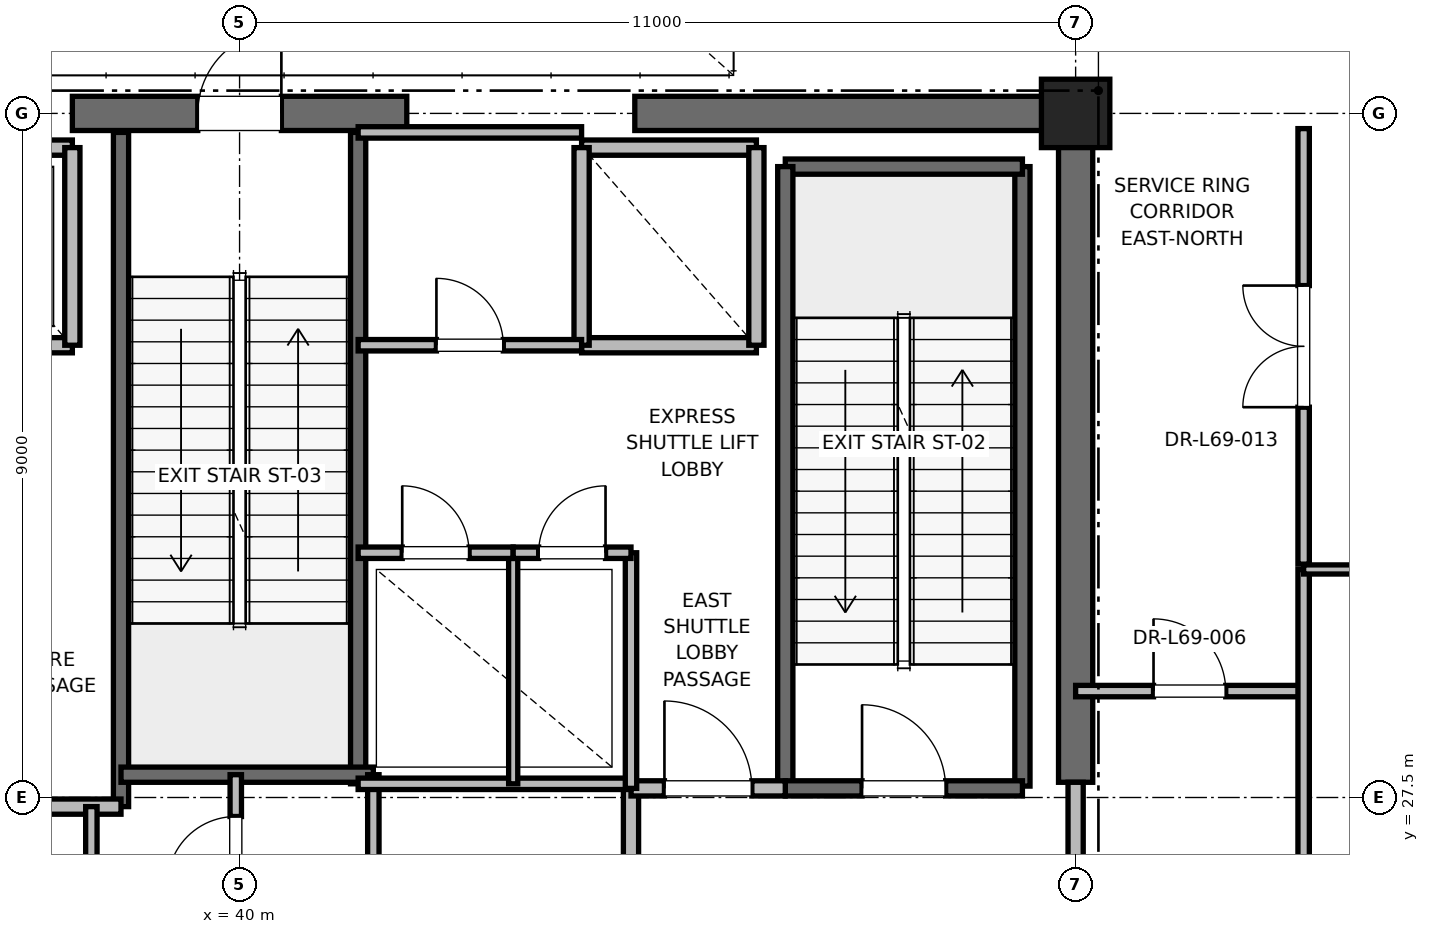
"""IFC4 building model, lengths in metres.
Left out: names, types, materials, properties, quantities, classifications, styles, units other than length and angle.
Written with IfcOpenShell. Run it as: python <this file> out.ifc"""

import sys

from ifc_helpers import new_model, si_unit, direction, frame, frame_2d, origin, origin_2d, place, context, subcontext, project, spatial, rectangle, extrude, element, fill, save


model = new_model("IFC4")
c1 = context("Model", 3, precision=1e-05, world=origin(), true_north=direction((0.0, 1.0)))
c2 = subcontext(c1, "Body", "Model", "MODEL_VIEW")
j1 = project(units=[si_unit("LENGTHUNIT", "METRE"), si_unit("PLANEANGLEUNIT", "RADIAN")], contexts=[c1])
p1 = place(None, origin())
s1 = spatial("IfcSite", under=j1, at=p1, CompositionType="ELEMENT")
p2 = place(p1, origin())
s2 = spatial("IfcBuilding", under=s1, at=p2, CompositionType="ELEMENT")
p3 = place(p2, frame((0.0, 0.0, 295.2)))
s3 = spatial("IfcBuildingStorey", under=s2, at=p3, CompositionType="ELEMENT", Elevation=295.2)
p4 = place(p3, frame((51.0, 36.5, 0.0), z_axis=(0.0, 0.0, 1.0), x_axis=(1.0, 0.0, 0.0)))
e1 = element("IfcColumn", 1, at=p4, inside=s3, PredefinedType="PILASTER", context=c2, shape_type="SweptSolid", body=[
    extrude(rectangle(XDim=0.9, YDim=0.9, at=origin_2d()), origin(), (0.0, 0.0, 1.0), 5.8),
])
p5 = place(p3, frame((37.8, 36.5, 0.0), z_axis=(0.0, 0.0, 1.0), x_axis=(1.0, 0.0, 0.0)))
e2 = element("IfcWall", 2, at=p5, inside=s3, PredefinedType="SHEAR", context=c2, shape_type="SweptSolid", body=[
    extrude(rectangle(XDim=4.4, YDim=0.45, at=frame_2d((2.2, 0.0))), origin(), (0.0, 0.0, 1.0), 5.5),
])
p6 = place(p5, frame((1.65, 0.0, 0.0)))
e3 = element("IfcOpeningElement", 3, at=p6, cuts=e2, PredefinedType="OPENING", context=c2, shape_type="SweptSolid", body=[
    extrude(rectangle(XDim=1.1, YDim=2.15, at=frame_2d((0.55, 1.075))), frame((0.0, 0.225, 0.0), z_axis=(0.0, -1.0, 0.0), x_axis=(1.0, 0.0, 0.0)), (0.0, 0.0, 1.0), 0.45),
])
p7 = place(p3, frame((45.2, 36.5, 0.0), z_axis=(0.0, 0.0, 1.0), x_axis=(1.0, 0.0, 0.0)))
e4 = element("IfcWall", 4, at=p7, inside=s3, PredefinedType="SHEAR", context=c2, shape_type="SweptSolid", body=[
    extrude(rectangle(XDim=5.8, YDim=0.45, at=frame_2d((2.9, 0.0))), origin(), (0.0, 0.0, 1.0), 5.5),
])
p8 = place(p3, frame((51.0, 27.7, 0.0), z_axis=(0.0, 0.0, 1.0), x_axis=(0.0, 1.0, 0.0)))
e5 = element("IfcWall", 5, at=p8, inside=s3, PredefinedType="SHEAR", context=c2, shape_type="SweptSolid", body=[
    extrude(rectangle(XDim=8.8, YDim=0.45, at=frame_2d((4.4, 0.0))), origin(), (0.0, 0.0, 1.0), 5.5),
])
p9 = place(p3, frame((50.3, 27.65, 0.0), z_axis=(0.0, 0.0, 1.0), x_axis=(0.0, 1.0, 0.0)))
e6 = element("IfcWall", 6, at=p9, inside=s3, PredefinedType="SOLIDWALL", context=c2, shape_type="SweptSolid", body=[
    extrude(rectangle(XDim=8.15, YDim=0.2, at=frame_2d((4.075, 0.0))), origin(), (0.0, 0.0, 1.0), 5.5),
])
p10 = place(p3, frame((47.18, 35.8, 0.0), z_axis=(0.0, 0.0, 1.0), x_axis=(1.0, 0.0, 0.0)))
e7 = element("IfcWall", 7, at=p10, inside=s3, PredefinedType="SOLIDWALL", context=c2, shape_type="SweptSolid", body=[
    extrude(rectangle(XDim=3.12, YDim=0.2, at=frame_2d((1.56, 0.0))), origin(), (0.0, 0.0, 1.0), 5.5),
])
p11 = place(p3, frame((47.18, 27.62, 0.0), z_axis=(0.0, 0.0, 1.0), x_axis=(0.0, 1.0, 0.0)))
e8 = element("IfcWall", 8, at=p11, inside=s3, PredefinedType="SOLIDWALL", context=c2, shape_type="SweptSolid", body=[
    extrude(rectangle(XDim=8.18, YDim=0.2, at=frame_2d((4.09, 0.0))), origin(), (0.0, 0.0, 1.0), 5.5),
])
p12 = place(p3, frame((47.18, 27.62, 0.0), z_axis=(0.0, 0.0, 1.0), x_axis=(1.0, 0.0, 0.0)))
e9 = element("IfcWall", 9, at=p12, inside=s3, PredefinedType="SOLIDWALL", context=c2, shape_type="SweptSolid", body=[
    extrude(rectangle(XDim=3.12, YDim=0.2, at=frame_2d((1.56, 0.0))), origin(), (0.0, 0.0, 1.0), 5.5),
])
p13 = place(p12, frame((1.01, 0.0, 0.0)))
e10 = element("IfcOpeningElement", 10, at=p13, cuts=e9, PredefinedType="OPENING", context=c2, shape_type="SweptSolid", body=[
    extrude(rectangle(XDim=1.1, YDim=2.15, at=frame_2d((0.55, 1.075))), frame((0.0, 0.1, 0.0), z_axis=(0.0, -1.0, 0.0), x_axis=(1.0, 0.0, 0.0)), (0.0, 0.0, 1.0), 0.2),
])
p14 = place(p3, frame((38.44, 27.38, 0.0), z_axis=(0.0, 0.0, 1.0), x_axis=(0.0, 1.0, 0.0)))
e11 = element("IfcWall", 11, at=p14, inside=s3, PredefinedType="SOLIDWALL", context=c2, shape_type="SweptSolid", body=[
    extrude(rectangle(XDim=8.87, YDim=0.2, at=frame_2d((4.435, 0.0))), origin(), (0.0, 0.0, 1.0), 5.5),
])
p15 = place(p3, frame((41.56, 27.68, 0.0), z_axis=(0.0, 0.0, 1.0), x_axis=(0.0, 1.0, 0.0)))
e12 = element("IfcWall", 12, at=p15, inside=s3, PredefinedType="SOLIDWALL", context=c2, shape_type="SweptSolid", body=[
    extrude(rectangle(XDim=8.57, YDim=0.2, at=frame_2d((4.285, 0.0))), origin(), (0.0, 0.0, 1.0), 5.5),
])
p16 = place(p3, frame((38.44, 27.8, 0.0), z_axis=(0.0, 0.0, 1.0), x_axis=(1.0, 0.0, 0.0)))
e13 = element("IfcWall", 13, at=p16, inside=s3, PredefinedType="SOLIDWALL", context=c2, shape_type="SweptSolid", body=[
    extrude(rectangle(XDim=3.32, YDim=0.2, at=frame_2d((1.66, 0.0))), origin(), (0.0, 0.0, 1.0), 5.5),
])
p17 = place(p3, frame((32.82, 27.38, 0.0), z_axis=(0.0, 0.0, 1.0), x_axis=(1.0, 0.0, 0.0)))
e14 = element("IfcWall", 14, at=p17, inside=s3, PredefinedType="PARTITIONING", context=c2, shape_type="SweptSolid", body=[
    extrude(rectangle(XDim=5.62, YDim=0.2, at=frame_2d((2.81, 0.0))), origin(), (0.0, 0.0, 1.0), 5.5),
])
p18 = place(p3, frame((45.15, 24.25, 0.0), z_axis=(0.0, 0.0, 1.0), x_axis=(0.0, 1.0, 0.0)))
e15 = element("IfcWall", 15, at=p18, inside=s3, PredefinedType="PARTITIONING", context=c2, shape_type="SweptSolid", body=[
    extrude(rectangle(XDim=3.37, YDim=0.2, at=frame_2d((1.685, 0.0))), origin(), (0.0, 0.0, 1.0), 5.5),
])
p19 = place(p3, frame((45.15, 27.62, 0.0), z_axis=(0.0, 0.0, 1.0), x_axis=(1.0, 0.0, 0.0)))
e16 = element("IfcWall", 16, at=p19, inside=s3, PredefinedType="PARTITIONING", context=c2, shape_type="SweptSolid", body=[
    extrude(rectangle(XDim=2.03, YDim=0.2, at=frame_2d((1.015, 0.0))), origin(), (0.0, 0.0, 1.0), 5.5),
])
p20 = place(p19, frame((0.44, 0.0, 0.0)))
e17 = element("IfcOpeningElement", 17, at=p20, cuts=e16, PredefinedType="OPENING", context=c2, shape_type="SweptSolid", body=[
    extrude(rectangle(XDim=1.15, YDim=2.2, at=frame_2d((0.575, 1.1))), frame((0.0, 0.1, 0.0), z_axis=(0.0, -1.0, 0.0), x_axis=(1.0, 0.0, 0.0)), (0.0, 0.0, 1.0), 0.2),
])
p21 = place(p3, frame((51.0, 24.3, 0.0), z_axis=(0.0, 0.0, 1.0), x_axis=(0.0, 1.0, 0.0)))
e18 = element("IfcWall", 18, at=p21, inside=s3, PredefinedType="PARTITIONING", context=c2, shape_type="SweptSolid", body=[
    extrude(rectangle(XDim=3.4, YDim=0.2, at=frame_2d((1.7, 0.0))), origin(), (0.0, 0.0, 1.0), 4.58),
])
p22 = place(p21, frame((1.125, 0.0, 0.0)))
e19 = element("IfcOpeningElement", 19, at=p22, cuts=e18, PredefinedType="OPENING", context=c2, shape_type="SweptSolid", body=[
    extrude(rectangle(XDim=1.15, YDim=2.2, at=frame_2d((0.575, 1.1))), frame((0.0, 0.1, 0.0), z_axis=(0.0, -1.0, 0.0), x_axis=(1.0, 0.0, 0.0)), (0.0, 0.0, 1.0), 0.2),
])
p23 = place(p3, frame((35.5, 33.45, 0.0), z_axis=(0.0, 0.0, 1.0), x_axis=(1.0, 0.0, 0.0)))
e20 = element("IfcWall", 20, at=p23, inside=s3, PredefinedType="SOLIDWALL", context=c2, shape_type="SweptSolid", body=[
    extrude(rectangle(XDim=2.3, YDim=0.2, at=frame_2d((1.15, 0.0))), origin(), (0.0, 0.0, 1.0), 5.5),
])
p24 = place(p23, frame((0.6, 0.0, 0.0)))
e21 = element("IfcOpeningElement", 21, at=p24, cuts=e20, PredefinedType="OPENING", context=c2, shape_type="SweptSolid", body=[
    extrude(rectangle(XDim=1.1, YDim=2.2, at=frame_2d((0.55, 1.1))), frame((0.0, 0.1, 0.0), z_axis=(0.0, -1.0, 0.0), x_axis=(1.0, 0.0, 0.0)), (0.0, 0.0, 1.0), 0.2),
])
p25 = place(p3, frame((37.8, 36.05, 0.0), z_axis=(0.0, 0.0, 1.0), x_axis=(-1.0, 0.0, 0.0)))
e22 = element("IfcWall", 22, at=p25, inside=s3, PredefinedType="SOLIDWALL", context=c2, shape_type="SweptSolid", body=[
    extrude(rectangle(XDim=2.3, YDim=0.2, at=frame_2d((1.15, 0.0))), origin(), (0.0, 0.0, 1.0), 4.58),
])
p26 = place(p3, frame((37.8, 33.45, 0.0), z_axis=(0.0, 0.0, 1.0), x_axis=(0.0, 1.0, 0.0)))
e23 = element("IfcWall", 23, at=p26, inside=s3, PredefinedType="SOLIDWALL", context=c2, shape_type="SweptSolid", body=[
    extrude(rectangle(XDim=2.6, YDim=0.2, at=frame_2d((1.3, 0.0))), origin(), (0.0, 0.0, 1.0), 4.58),
])
p27 = place(p3, frame((44.5, 33.45, 0.0), z_axis=(0.0, 0.0, 1.0), x_axis=(1.0, 0.0, 0.0)))
e24 = element("IfcWall", 24, at=p27, inside=s3, PredefinedType="SOLIDWALL", context=c2, shape_type="SweptSolid", body=[
    extrude(rectangle(XDim=2.3, YDim=0.2, at=frame_2d((1.15, 0.0))), origin(), (0.0, 0.0, 1.0), 5.5),
])
p28 = place(p3, frame((46.8, 36.05, 0.0), z_axis=(0.0, 0.0, 1.0), x_axis=(-1.0, 0.0, 0.0)))
e25 = element("IfcWall", 25, at=p28, inside=s3, PredefinedType="SOLIDWALL", context=c2, shape_type="SweptSolid", body=[
    extrude(rectangle(XDim=2.3, YDim=0.2, at=frame_2d((1.15, 0.0))), origin(), (0.0, 0.0, 1.0), 4.58),
])
p29 = place(p3, frame((44.5, 36.05, 0.0), z_axis=(0.0, 0.0, 1.0), x_axis=(0.0, -1.0, 0.0)))
e26 = element("IfcWall", 26, at=p29, inside=s3, PredefinedType="SOLIDWALL", context=c2, shape_type="SweptSolid", body=[
    extrude(rectangle(XDim=2.6, YDim=0.2, at=frame_2d((1.3, 0.0))), origin(), (0.0, 0.0, 1.0), 4.58),
])
p30 = place(p3, frame((46.8, 33.45, 0.0), z_axis=(0.0, 0.0, 1.0), x_axis=(0.0, 1.0, 0.0)))
e27 = element("IfcWall", 27, at=p30, inside=s3, PredefinedType="SOLIDWALL", context=c2, shape_type="SweptSolid", body=[
    extrude(rectangle(XDim=2.6, YDim=0.2, at=frame_2d((1.3, 0.0))), origin(), (0.0, 0.0, 1.0), 5.5),
])
p31 = place(p3, frame((41.76, 23.8, 0.0), z_axis=(0.0, 0.0, 1.0), x_axis=(0.0, 1.0, 0.0)))
e28 = element("IfcWall", 28, at=p31, inside=s3, PredefinedType="PARTITIONING", context=c2, shape_type="SweptSolid", body=[
    extrude(rectangle(XDim=4.0, YDim=0.15, at=frame_2d((2.0, 0.0))), origin(), (0.0, 0.0, 1.0), 2.85),
])
p32 = place(p3, frame((39.95, 25.8, 0.0), z_axis=(0.0, 0.0, 1.0), x_axis=(0.0, 1.0, 0.0)))
e29 = element("IfcWall", 29, at=p32, inside=s3, PredefinedType="PARTITIONING", context=c2, shape_type="SweptSolid", body=[
    extrude(rectangle(XDim=2.0, YDim=0.15, at=frame_2d((1.0, 0.0))), origin(), (0.0, 0.0, 1.0), 2.85),
])
p33 = place(p32, frame((0.55, 0.0, 0.0)))
e30 = element("IfcOpeningElement", 30, at=p33, cuts=e29, PredefinedType="OPENING", context=c2, shape_type="SweptSolid", body=[
    extrude(rectangle(XDim=0.9, YDim=2.1, at=frame_2d((0.45, 1.05))), frame((0.0, 0.075, 0.0), z_axis=(0.0, -1.0, 0.0), x_axis=(1.0, 0.0, 0.0)), (0.0, 0.0, 1.0), 0.15),
])
p34 = place(p3, frame((38.05, 24.5, 0.0), z_axis=(0.0, 0.0, 1.0), x_axis=(0.0, 1.0, 0.0)))
e31 = element("IfcWall", 31, at=p34, inside=s3, PredefinedType="PARTITIONING", context=c2, shape_type="SweptSolid", body=[
    extrude(rectangle(XDim=2.88, YDim=0.15, at=frame_2d((1.44, 0.0))), origin(), (0.0, 0.0, 1.0), 2.85),
])
p35 = place(p34, frame((1.0, 0.0, 0.0)))
e32 = element("IfcOpeningElement", 32, at=p35, cuts=e31, PredefinedType="OPENING", context=c2, shape_type="SweptSolid", body=[
    extrude(rectangle(XDim=0.88, YDim=2.1, at=frame_2d((0.44, 1.05))), frame((0.0, 0.075, 0.0), z_axis=(0.0, -1.0, 0.0), x_axis=(1.0, 0.0, 0.0)), (0.0, 0.0, 1.0), 0.15),
])
p36 = place(p3, frame((41.56, 27.68, 0.0), z_axis=(0.0, 0.0, 1.0), x_axis=(1.0, 0.0, 0.0)))
e33 = element("IfcWall", 33, at=p36, inside=s3, PredefinedType="PARTITIONING", context=c2, shape_type="SweptSolid", body=[
    extrude(rectangle(XDim=3.59, YDim=0.15, at=frame_2d((1.795, 0.0))), origin(), (0.0, 0.0, 1.0), 2.85),
])
p37 = place(p3, frame((45.15, 27.62, 0.0), z_axis=(0.0, 0.0, 1.0), x_axis=(0.0, 1.0, 0.0)))
e34 = element("IfcWall", 34, at=p37, inside=s3, PredefinedType="PARTITIONING", context=c2, shape_type="SweptSolid", body=[
    extrude(rectangle(XDim=3.1, YDim=0.15, at=frame_2d((1.55, 0.0))), origin(), (0.0, 0.0, 1.0), 2.85),
])
p38 = place(p3, frame((43.6, 27.68, 0.0), z_axis=(0.0, 0.0, 1.0), x_axis=(0.0, 1.0, 0.0)))
e35 = element("IfcWall", 35, at=p38, inside=s3, PredefinedType="PARTITIONING", context=c2, shape_type="SweptSolid", body=[
    extrude(rectangle(XDim=3.04, YDim=0.12, at=frame_2d((1.52, 0.0))), origin(), (0.0, 0.0, 1.0), 2.85),
])
p39 = place(p3, frame((41.56, 30.72, 0.0), z_axis=(0.0, 0.0, 1.0), x_axis=(1.0, 0.0, 0.0)))
e36 = element("IfcWall", 36, at=p39, inside=s3, PredefinedType="PARTITIONING", context=c2, shape_type="SweptSolid", body=[
    extrude(rectangle(XDim=2.04, YDim=0.15, at=frame_2d((1.02, 0.0))), origin(), (0.0, 0.0, 1.0), 2.85),
])
p40 = place(p39, frame((0.58, 0.0, 0.0)))
e37 = element("IfcOpeningElement", 37, at=p40, cuts=e36, PredefinedType="OPENING", context=c2, shape_type="SweptSolid", body=[
    extrude(rectangle(XDim=0.88, YDim=2.1, at=frame_2d((0.44, 1.05))), frame((0.0, 0.075, 0.0), z_axis=(0.0, -1.0, 0.0), x_axis=(1.0, 0.0, 0.0)), (0.0, 0.0, 1.0), 0.15),
])
p41 = place(p3, frame((43.6, 30.72, 0.0), z_axis=(0.0, 0.0, 1.0), x_axis=(1.0, 0.0, 0.0)))
e38 = element("IfcWall", 38, at=p41, inside=s3, PredefinedType="PARTITIONING", context=c2, shape_type="SweptSolid", body=[
    extrude(rectangle(XDim=1.55, YDim=0.15, at=frame_2d((0.775, 0.0))), origin(), (0.0, 0.0, 1.0), 2.85),
])
p42 = place(p41, frame((0.335, 0.0, 0.0)))
e39 = element("IfcOpeningElement", 39, at=p42, cuts=e38, PredefinedType="OPENING", context=c2, shape_type="SweptSolid", body=[
    extrude(rectangle(XDim=0.88, YDim=2.1, at=frame_2d((0.44, 1.05))), frame((0.0, 0.075, 0.0), z_axis=(0.0, -1.0, 0.0), x_axis=(1.0, 0.0, 0.0)), (0.0, 0.0, 1.0), 0.15),
])
p43 = place(p3, frame((41.56, 36.25, 0.0), z_axis=(0.0, 0.0, 1.0), x_axis=(1.0, 0.0, 0.0)))
e40 = element("IfcWall", 40, at=p43, inside=s3, PredefinedType="PARTITIONING", context=c2, shape_type="SweptSolid", body=[
    extrude(rectangle(XDim=2.94, YDim=0.15, at=frame_2d((1.47, 0.0))), origin(), (0.0, 0.0, 1.0), 2.85),
])
p44 = place(p3, frame((41.56, 33.45, 0.0), z_axis=(0.0, 0.0, 1.0), x_axis=(1.0, 0.0, 0.0)))
e41 = element("IfcWall", 41, at=p44, inside=s3, PredefinedType="PARTITIONING", context=c2, shape_type="SweptSolid", body=[
    extrude(rectangle(XDim=2.94, YDim=0.15, at=frame_2d((1.47, 0.0))), origin(), (0.0, 0.0, 1.0), 2.85),
])
p45 = place(p44, frame((1.03, 0.0, 0.0)))
e42 = element("IfcOpeningElement", 42, at=p45, cuts=e41, PredefinedType="OPENING", context=c2, shape_type="SweptSolid", body=[
    extrude(rectangle(XDim=0.88, YDim=2.1, at=frame_2d((0.44, 1.05))), frame((0.0, 0.075, 0.0), z_axis=(0.0, -1.0, 0.0), x_axis=(1.0, 0.0, 0.0)), (0.0, 0.0, 1.0), 0.15),
])
p46 = place(p3, frame((51.0, 28.9, 0.0), z_axis=(0.0, 0.0, 1.0), x_axis=(1.0, 0.0, 0.0)))
e43 = element("IfcWall", 43, at=p46, inside=s3, PredefinedType="PARTITIONING", context=c2, shape_type="SweptSolid", body=[
    extrude(rectangle(XDim=3.0, YDim=0.15, at=frame_2d((1.5, 0.0))), origin(), (0.0, 0.0, 1.0), 2.85),
])
p47 = place(p46, frame((1.025, 0.0, 0.0)))
e44 = element("IfcOpeningElement", 44, at=p47, cuts=e43, PredefinedType="OPENING", context=c2, shape_type="SweptSolid", body=[
    extrude(rectangle(XDim=0.95, YDim=2.15, at=frame_2d((0.475, 1.075))), frame((0.0, 0.075, 0.0), z_axis=(0.0, -1.0, 0.0), x_axis=(1.0, 0.0, 0.0)), (0.0, 0.0, 1.0), 0.15),
])
p48 = place(p3, frame((54.0, 18.7, 0.0), z_axis=(0.0, 0.0, 1.0), x_axis=(0.0, 1.0, 0.0)))
e45 = element("IfcWall", 45, at=p48, inside=s3, PredefinedType="PARTITIONING", context=c2, shape_type="SweptSolid", body=[
    extrude(rectangle(XDim=11.8, YDim=0.15, at=frame_2d((5.9, 0.0))), origin(), (0.0, 0.0, 1.0), 2.85),
])
p49 = place(p48, frame((6.825, 0.0, 0.0)))
e46 = element("IfcOpeningElement", 46, at=p49, cuts=e45, PredefinedType="OPENING", context=c2, shape_type="SweptSolid", body=[
    extrude(rectangle(XDim=0.95, YDim=2.15, at=frame_2d((0.475, 1.075))), frame((0.0, 0.075, 0.0), z_axis=(0.0, -1.0, 0.0), x_axis=(1.0, 0.0, 0.0)), (0.0, 0.0, 1.0), 0.15),
])
p50 = place(p3, frame((54.0, 30.5, 0.0), z_axis=(0.0, 0.0, 1.0), x_axis=(1.0, 0.0, 0.0)))
e47 = element("IfcWall", 47, at=p50, inside=s3, PredefinedType="PARTITIONING", context=c2, shape_type="SweptSolid", body=[
    extrude(rectangle(XDim=4.3, YDim=0.12, at=frame_2d((2.15, 0.0))), origin(), (0.0, 0.0, 1.0), 2.85),
])
p51 = place(p3, frame((54.0, 30.57, 0.0), z_axis=(0.0, 0.0, 1.0), x_axis=(0.0, 1.0, 0.0)))
e48 = element("IfcWall", 48, at=p51, inside=s3, PredefinedType="PARTITIONING", context=c2, shape_type="SweptSolid", body=[
    extrude(rectangle(XDim=5.73, YDim=0.15, at=frame_2d((2.865, 0.0))), origin(), (0.0, 0.0, 1.0), 2.85),
])
p52 = place(p51, frame((2.065, 0.0, 0.0)))
e49 = element("IfcOpeningElement", 49, at=p52, cuts=e48, PredefinedType="OPENING", context=c2, shape_type="SweptSolid", body=[
    extrude(rectangle(XDim=1.6, YDim=2.25, at=frame_2d((0.8, 1.125))), frame((0.0, 0.075, 0.0), z_axis=(0.0, -1.0, 0.0), x_axis=(1.0, 0.0, 0.0)), (0.0, 0.0, 1.0), 0.15),
])
p53 = place(p13, origin())
e50 = element("IfcDoor", 50, at=p53, inside=s3, OperationType="SINGLE_SWING_LEFT", PredefinedType="DOOR", context=c2, shape_type="SweptSolid", body=[
    extrude(rectangle(XDim=1.1, YDim=2.15, at=frame_2d((0.55, 1.075))), frame((0.0, 0.025, 0.0), z_axis=(0.0, -1.0, 0.0), x_axis=(1.0, 0.0, 0.0)), (0.0, 0.0, 1.0), 0.05),
])
fill(e10, e50)
p54 = place(p6, origin())
e51 = element("IfcDoor", 51, at=p54, inside=s3, OperationType="SINGLE_SWING_RIGHT", PredefinedType="DOOR", context=c2, shape_type="SweptSolid", body=[
    extrude(rectangle(XDim=1.1, YDim=2.15, at=frame_2d((0.55, 1.075))), frame((0.0, 0.025, 0.0), z_axis=(0.0, -1.0, 0.0), x_axis=(1.0, 0.0, 0.0)), (0.0, 0.0, 1.0), 0.05),
])
fill(e3, e51)
p55 = place(p20, origin())
e52 = element("IfcDoor", 52, at=p55, inside=s3, OperationType="SINGLE_SWING_LEFT", PredefinedType="DOOR", context=c2, shape_type="SweptSolid", body=[
    extrude(rectangle(XDim=1.15, YDim=2.2, at=frame_2d((0.575, 1.1))), frame((0.0, 0.025, 0.0), z_axis=(0.0, -1.0, 0.0), x_axis=(1.0, 0.0, 0.0)), (0.0, 0.0, 1.0), 0.05),
])
fill(e17, e52)
p56 = place(p33, origin())
e53 = element("IfcDoor", 53, at=p56, inside=s3, OperationType="SINGLE_SWING_LEFT", PredefinedType="DOOR", context=c2, shape_type="SweptSolid", body=[
    extrude(rectangle(XDim=0.9, YDim=2.1, at=frame_2d((0.45, 1.05))), frame((0.0, 0.025, 0.0), z_axis=(0.0, -1.0, 0.0), x_axis=(1.0, 0.0, 0.0)), (0.0, 0.0, 1.0), 0.05),
])
fill(e30, e53)
p57 = place(p40, origin())
e54 = element("IfcDoor", 54, at=p57, inside=s3, OperationType="SINGLE_SWING_LEFT", PredefinedType="DOOR", context=c2, shape_type="SweptSolid", body=[
    extrude(rectangle(XDim=0.88, YDim=2.1, at=frame_2d((0.44, 1.05))), frame((0.0, 0.025, 0.0), z_axis=(0.0, -1.0, 0.0), x_axis=(1.0, 0.0, 0.0)), (0.0, 0.0, 1.0), 0.05),
])
fill(e37, e54)
p58 = place(p42, origin())
e55 = element("IfcDoor", 55, at=p58, inside=s3, OperationType="SINGLE_SWING_RIGHT", PredefinedType="DOOR", context=c2, shape_type="SweptSolid", body=[
    extrude(rectangle(XDim=0.88, YDim=2.1, at=frame_2d((0.44, 1.05))), frame((0.0, 0.025, 0.0), z_axis=(0.0, -1.0, 0.0), x_axis=(1.0, 0.0, 0.0)), (0.0, 0.0, 1.0), 0.05),
])
fill(e39, e55)
p59 = place(p45, origin())
e56 = element("IfcDoor", 56, at=p59, inside=s3, OperationType="SINGLE_SWING_LEFT", PredefinedType="DOOR", context=c2, shape_type="SweptSolid", body=[
    extrude(rectangle(XDim=0.88, YDim=2.1, at=frame_2d((0.44, 1.05))), frame((0.0, 0.025, 0.0), z_axis=(0.0, -1.0, 0.0), x_axis=(1.0, 0.0, 0.0)), (0.0, 0.0, 1.0), 0.05),
])
fill(e42, e56)
p60 = place(p47, origin())
e57 = element("IfcDoor", 57, at=p60, inside=s3, OperationType="SINGLE_SWING_LEFT", PredefinedType="DOOR", context=c2, shape_type="SweptSolid", body=[
    extrude(rectangle(XDim=0.95, YDim=2.15, at=frame_2d((0.475, 1.075))), frame((0.0, 0.025, 0.0), z_axis=(0.0, -1.0, 0.0), x_axis=(1.0, 0.0, 0.0)), (0.0, 0.0, 1.0), 0.05),
])
fill(e44, e57)
p61 = place(p52, origin())
e58 = element("IfcDoor", 58, at=p61, inside=s3, OperationType="DOUBLE_DOOR_SINGLE_SWING", PredefinedType="DOOR", context=c2, shape_type="SweptSolid", body=[
    extrude(rectangle(XDim=1.6, YDim=2.25, at=frame_2d((0.8, 1.125))), frame((0.0, 0.025, 0.0), z_axis=(0.0, -1.0, 0.0), x_axis=(1.0, 0.0, 0.0)), (0.0, 0.0, 1.0), 0.05),
])
fill(e49, e58)
save(model, sys.argv[1])
